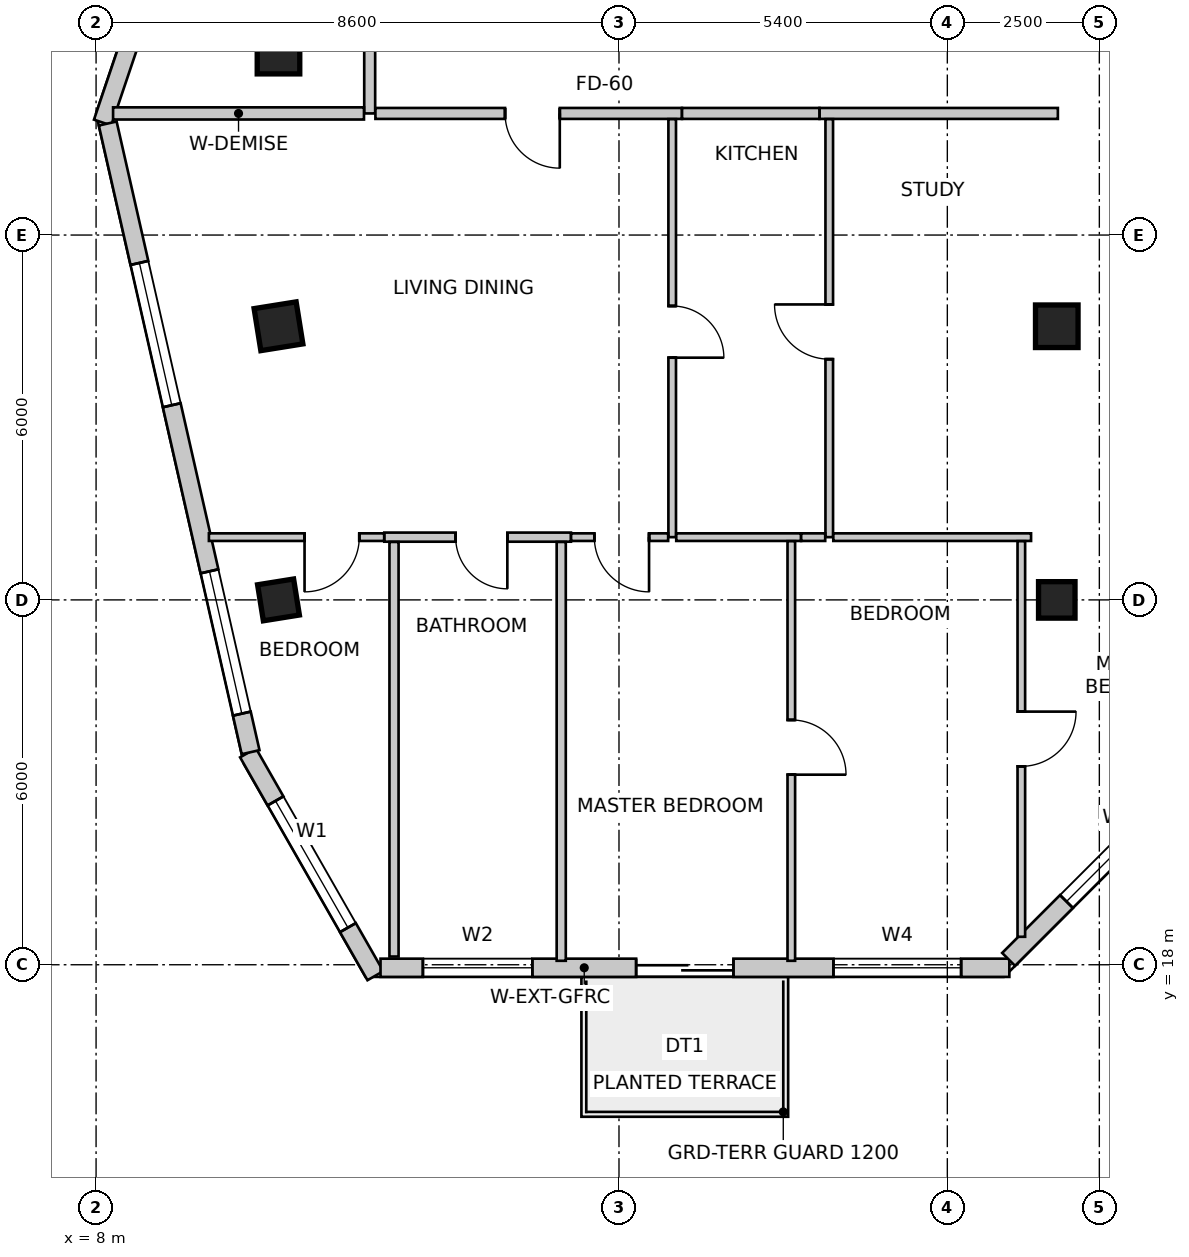
"""IFC4 building model, lengths in metres.
Left out: names, types, materials, properties, quantities, classifications, styles, units other than length and angle.
Written with IfcOpenShell. Run it as: python <this file> out.ifc"""

import sys

from ifc_helpers import new_model, si_unit, direction, frame, frame_2d, origin, origin_2d, place, context, subcontext, project, spatial, rectangle, extrude, source, transform, mapped, element, fill, save


model = new_model("IFC4")
c1 = context("Model", 3, precision=1e-05, world=origin(), true_north=direction((0.0, 1.0)))
c2 = subcontext(c1, "Body", "Model", "MODEL_VIEW")
j1 = project(units=[si_unit("LENGTHUNIT", "METRE"), si_unit("PLANEANGLEUNIT", "RADIAN")], contexts=[c1])
p1 = place(None, origin())
s1 = spatial("IfcSite", under=j1, at=p1, CompositionType="ELEMENT")
p2 = place(p1, origin())
s2 = spatial("IfcBuilding", under=s1, at=p2, CompositionType="ELEMENT")
p3 = place(p2, frame((0.0, 0.0, 249.3)))
s3 = spatial("IfcBuildingStorey", under=s2, at=p3, CompositionType="ELEMENT", Elevation=249.3)
m1 = source(origin(), c2, "Body", "SweptSolid", [
    extrude(rectangle(XDim=0.7, YDim=0.7, at=origin_2d()), origin(), (0.0, 0.0, 1.0), 3.6),
])
for number, where, z_axis, x_axis in (
    (1, (11.0, 33.0, 0.0), (0.0, 0.0, 1.0), (1.0, 0.0, 0.0)),
    (2, (11.0, 28.5, 0.0), (0.0, 0.0, 1.0), (0.158, -0.987, 0.0)),
):
    element("IfcColumn", number, at=place(p3, frame(where, z_axis=z_axis, x_axis=x_axis)), inside=s3, PredefinedType="COLUMN", context=c2, shape_type="MappedRepresentation", body=[
        mapped(m1, transform((0.0, 0.0, 0.0), scale=1.0)),
    ])
m2 = source(origin(), c2, "Body", "SweptSolid", [
    extrude(rectangle(XDim=0.6, YDim=0.6, at=origin_2d()), origin(), (0.0, 0.0, 1.0), 3.6),
])
p4 = place(p3, frame((11.0, 24.0, 0.0), z_axis=(0.0, 0.0, 1.0), x_axis=(0.158158067254, -0.987413806751, 0.0)))
e3 = element("IfcColumn", 3, at=p4, inside=s3, PredefinedType="COLUMN", context=c2, shape_type="MappedRepresentation", body=[
    mapped(m2, transform((0.0, 0.0, 0.0), scale=1.0)),
])
p5 = place(p3, frame((23.8, 28.5, 0.0), z_axis=(0.0, 0.0, 1.0), x_axis=(1.0, 0.0, 0.0)))
e4 = element("IfcColumn", 4, at=p5, inside=s3, PredefinedType="COLUMN", context=c2, shape_type="MappedRepresentation", body=[
    mapped(m1, transform((0.0, 0.0, 0.0), scale=1.0)),
])
p6 = place(p3, frame((23.8, 24.0, 0.0), z_axis=(0.0, 0.0, 1.0), x_axis=(1.0, 0.0, 0.0)))
e5 = element("IfcColumn", 5, at=p6, inside=s3, PredefinedType="COLUMN", context=c2, shape_type="MappedRepresentation", body=[
    mapped(m2, transform((0.0, 0.0, 0.0), scale=1.0)),
])
p7 = place(p3, frame((10.499, 21.485, 0.0), z_axis=(0.0, 0.0, 1.0), x_axis=(0.496163848656, -0.868228907194, 0.0)))
e6 = element("IfcWall", 6, at=p7, inside=s3, PredefinedType="SOLIDWALL", context=c2, shape_type="SweptSolid", body=[
    extrude(rectangle(XDim=4.222, YDim=0.3, at=frame_2d((2.111, 0.0))), origin(), (0.0, 0.0, 1.0), 3.35),
])
m3 = source(origin(), c2, "Body", "SweptSolid", [
    extrude(rectangle(XDim=2.4, YDim=2.2, at=frame_2d((1.2, 1.1))), frame((0.0, 0.16, 0.0), z_axis=(0.0, -1.0, 0.0), x_axis=(1.0, 0.0, 0.0)), (0.0, 0.0, 1.0), 0.32),
])
p8 = place(p7, frame((0.911, 0.0, 0.85)))
e7 = element("IfcOpeningElement", 7, at=p8, cuts=e6, PredefinedType="OPENING", context=c2, shape_type="MappedRepresentation", body=[
    mapped(m3, transform((0.0, 0.0, 0.0), scale=1.0)),
])
p9 = place(p3, frame((12.678, 17.95, 0.0), z_axis=(0.0, 0.0, 1.0), x_axis=(1.0, 0.0, 0.0)))
e8 = element("IfcWall", 8, at=p9, inside=s3, PredefinedType="SOLIDWALL", context=c2, shape_type="SweptSolid", body=[
    extrude(rectangle(XDim=10.342, YDim=0.3, at=frame_2d((5.171, 0.0))), origin(), (0.0, 0.0, 1.0), 3.35),
])
m4 = source(origin(), c2, "Body", "SweptSolid", [
    extrude(rectangle(XDim=1.6, YDim=2.15, at=frame_2d((0.8, 1.075))), frame((0.0, 0.16, 0.0), z_axis=(0.0, -1.0, 0.0), x_axis=(1.0, 0.0, 0.0)), (0.0, 0.0, 1.0), 0.32),
])
p10 = place(p9, frame((4.204, 0.0, 0.0)))
e9 = element("IfcOpeningElement", 9, at=p10, cuts=e8, PredefinedType="OPENING", context=c2, shape_type="MappedRepresentation", body=[
    mapped(m4, transform((0.0, 0.0, 0.0), scale=1.0)),
])
m5 = source(origin(), c2, "Body", "SweptSolid", [
    extrude(rectangle(XDim=1.8, YDim=2.1, at=frame_2d((0.9, 1.05))), frame((0.0, 0.16, 0.0), z_axis=(0.0, -1.0, 0.0), x_axis=(1.0, 0.0, 0.0)), (0.0, 0.0, 1.0), 0.32),
])
p11 = place(p9, frame((0.697, 0.0, 0.85)))
e10 = element("IfcOpeningElement", 10, at=p11, cuts=e8, PredefinedType="OPENING", context=c2, shape_type="MappedRepresentation", body=[
    mapped(m5, transform((0.0, 0.0, 0.0), scale=1.0)),
])
m6 = source(origin(), c2, "Body", "SweptSolid", [
    extrude(rectangle(XDim=2.1, YDim=2.0, at=frame_2d((1.05, 1.0))), frame((0.0, 0.16, 0.0), z_axis=(0.0, -1.0, 0.0), x_axis=(1.0, 0.0, 0.0)), (0.0, 0.0, 1.0), 0.32),
])
p12 = place(p9, frame((7.449, 0.0, 0.85)))
e11 = element("IfcOpeningElement", 11, at=p12, cuts=e8, PredefinedType="OPENING", context=c2, shape_type="MappedRepresentation", body=[
    mapped(m6, transform((0.0, 0.0, 0.0), scale=1.0)),
])
p13 = place(p3, frame((23.008, 18.088, 0.0), z_axis=(0.0, 0.0, 1.0), x_axis=(0.707106781187, 0.707106781187, 0.0)))
e12 = element("IfcWall", 12, at=p13, inside=s3, PredefinedType="SOLIDWALL", context=c2, shape_type="SweptSolid", body=[
    extrude(rectangle(XDim=4.781, YDim=0.3, at=frame_2d((2.39, 0.0))), origin(), (0.0, 0.0, 1.0), 3.35),
])
p14 = place(p13, frame((1.346, 0.0, 0.85)))
e13 = element("IfcOpeningElement", 13, at=p14, cuts=e12, PredefinedType="OPENING", context=c2, shape_type="MappedRepresentation", body=[
    mapped(m3, transform((0.0, 0.0, 0.0), scale=1.0)),
])
p15 = place(p3, frame((13.269, 47.134, 0.0), z_axis=(0.0, 0.0, 1.0), x_axis=(-0.3199211297, -0.947444178182, 0.0)))
e14 = element("IfcWall", 14, at=p15, inside=s3, PredefinedType="SOLIDWALL", context=c2, shape_type="SweptSolid", body=[
    extrude(rectangle(XDim=16.132, YDim=0.3, at=frame_2d((8.066, 0.0))), origin(), (0.0, 0.0, 1.0), 3.35),
])
p16 = place(p15, frame((2.585, 0.0, 0.85)))
e15 = element("IfcOpeningElement", 15, at=p16, cuts=e14, PredefinedType="OPENING", context=c2, shape_type="MappedRepresentation", body=[
    mapped(m6, transform((0.0, 0.0, 0.0), scale=1.0)),
])
p17 = place(p15, frame((7.267, 0.0, 0.85)))
e16 = element("IfcOpeningElement", 16, at=p17, cuts=e14, PredefinedType="OPENING", context=c2, shape_type="MappedRepresentation", body=[
    mapped(m3, transform((0.0, 0.0, 0.0), scale=1.0)),
])
p18 = place(p15, frame((12.249, 0.0, 0.85)))
e17 = element("IfcOpeningElement", 17, at=p18, cuts=e14, PredefinedType="OPENING", context=c2, shape_type="MappedRepresentation", body=[
    mapped(m6, transform((0.0, 0.0, 0.0), scale=1.0)),
])
p19 = place(p3, frame((8.191, 31.834, 0.0), z_axis=(0.0, 0.0, 1.0), x_axis=(0.221636032737, -0.975129462683, 0.0)))
e18 = element("IfcWall", 18, at=p19, inside=s3, PredefinedType="SOLIDWALL", context=c2, shape_type="SweptSolid", body=[
    extrude(rectangle(XDim=10.602, YDim=0.3, at=frame_2d((5.301, 0.0))), origin(), (0.0, 0.0, 1.0), 3.35),
])
p20 = place(p19, frame((2.351, 0.0, 0.85)))
e19 = element("IfcOpeningElement", 19, at=p20, cuts=e18, PredefinedType="OPENING", context=c2, shape_type="MappedRepresentation", body=[
    mapped(m3, transform((0.0, 0.0, 0.0), scale=1.0)),
])
p21 = place(p19, frame((7.552, 0.0, 0.85)))
e20 = element("IfcOpeningElement", 20, at=p21, cuts=e18, PredefinedType="OPENING", context=c2, shape_type="MappedRepresentation", body=[
    mapped(m3, transform((0.0, 0.0, 0.0), scale=1.0)),
])
p22 = place(p3, frame((12.5, 32.0, 0.0), z_axis=(0.0, 0.0, 1.0), x_axis=(0.0, 1.0, 0.0)))
e21 = element("IfcWall", 21, at=p22, inside=s3, PredefinedType="PARTITIONING", context=c2, shape_type="SweptSolid", body=[
    extrude(rectangle(XDim=1.556, YDim=0.18, at=frame_2d((0.778, 0.0))), origin(), (0.0, 0.0, 1.0), 2.935),
])
p23 = place(p3, frame((23.818, 32.0, 0.0), z_axis=(0.0, 0.0, 1.0), x_axis=(-1.0, 0.0, 0.0)))
e22 = element("IfcWall", 22, at=p23, inside=s3, PredefinedType="PARTITIONING", context=c2, shape_type="SweptSolid", body=[
    extrude(rectangle(XDim=3.92, YDim=0.18, at=frame_2d((1.96, 0.0))), origin(), (0.0, 0.0, 1.0), 2.935),
])
p24 = place(p3, frame((17.635, 32.0, 0.0), z_axis=(0.0, 0.0, 1.0), x_axis=(-1.0, 0.0, 0.0)))
e23 = element("IfcWall", 23, at=p24, inside=s3, PredefinedType="PARTITIONING", context=c2, shape_type="SweptSolid", body=[
    extrude(rectangle(XDim=5.041, YDim=0.18, at=frame_2d((2.521, 0.0))), origin(), (0.0, 0.0, 1.0), 2.935),
])
m7 = source(origin(), c2, "Body", "SweptSolid", [
    extrude(rectangle(XDim=0.9, YDim=2.15, at=frame_2d((0.45, 1.075))), frame((0.0, 0.1, 0.0), z_axis=(0.0, -1.0, 0.0), x_axis=(1.0, 0.0, 0.0)), (0.0, 0.0, 1.0), 0.2),
])
p25 = place(p24, frame((2.009, 0.0, 0.0)))
e24 = element("IfcOpeningElement", 24, at=p25, cuts=e23, PredefinedType="OPENING", context=c2, shape_type="MappedRepresentation", body=[
    mapped(m7, transform((0.0, 0.0, 0.0), scale=1.0)),
])
p26 = place(p3, frame((19.896, 32.0, 0.0), z_axis=(0.0, 0.0, 1.0), x_axis=(-1.0, 0.0, 0.0)))
e25 = element("IfcWall", 25, at=p26, inside=s3, PredefinedType="PARTITIONING", context=c2, shape_type="SweptSolid", body=[
    extrude(rectangle(XDim=2.259, YDim=0.18, at=frame_2d((1.129, 0.0))), origin(), (0.0, 0.0, 1.0), 3.35),
])
p27 = place(p3, frame((12.406, 32.0, 0.0), z_axis=(0.0, 0.0, 1.0), x_axis=(-1.0, 0.0, 0.0)))
e26 = element("IfcWall", 26, at=p27, inside=s3, PredefinedType="PARTITIONING", context=c2, shape_type="SweptSolid", body=[
    extrude(rectangle(XDim=4.126, YDim=0.2, at=frame_2d((2.063, 0.0))), origin(), (0.0, 0.0, 1.0), 2.642),
])
p28 = place(p3, frame((20.058, 25.032, 0.0), z_axis=(0.0, 0.0, 1.0), x_axis=(0.0, 1.0, 0.0)))
e27 = element("IfcWall", 27, at=p28, inside=s3, PredefinedType="PARTITIONING", context=c2, shape_type="SweptSolid", body=[
    extrude(rectangle(XDim=6.874, YDim=0.125, at=frame_2d((3.437, 0.0))), origin(), (0.0, 0.0, 1.0), 2.788),
])
m8 = source(origin(), c2, "Body", "SweptSolid", [
    extrude(rectangle(XDim=0.9, YDim=2.15, at=frame_2d((0.45, 1.075))), frame((0.0, 0.073, 0.0), z_axis=(0.0, -1.0, 0.0), x_axis=(1.0, 0.0, 0.0)), (0.0, 0.0, 1.0), 0.145),
])
p29 = place(p28, frame((2.927, 0.0, 0.0)))
e28 = element("IfcOpeningElement", 28, at=p29, cuts=e27, PredefinedType="OPENING", context=c2, shape_type="MappedRepresentation", body=[
    mapped(m8, transform((0.0, 0.0, 0.0), scale=1.0)),
])
p30 = place(p3, frame((23.377, 25.032, 0.0), z_axis=(0.0, 0.0, 1.0), x_axis=(-1.0, 0.0, 0.0)))
e29 = element("IfcWall", 29, at=p30, inside=s3, PredefinedType="PARTITIONING", context=c2, shape_type="SweptSolid", body=[
    extrude(rectangle(XDim=3.252, YDim=0.125, at=frame_2d((1.626, 0.0))), origin(), (0.0, 0.0, 1.0), 2.935),
])
p31 = place(p3, frame((17.475, 31.906, 0.0), z_axis=(0.0, 0.0, 1.0), x_axis=(0.0, -1.0, 0.0)))
e30 = element("IfcWall", 30, at=p31, inside=s3, PredefinedType="PARTITIONING", context=c2, shape_type="SweptSolid", body=[
    extrude(rectangle(XDim=6.874, YDim=0.125, at=frame_2d((3.437, 0.0))), origin(), (0.0, 0.0, 1.0), 2.788),
])
m9 = source(origin(), c2, "Body", "SweptSolid", [
    extrude(rectangle(XDim=0.85, YDim=2.15, at=frame_2d((0.425, 1.075))), frame((0.0, 0.073, 0.0), z_axis=(0.0, -1.0, 0.0), x_axis=(1.0, 0.0, 0.0)), (0.0, 0.0, 1.0), 0.145),
])
p32 = place(p31, frame((3.073, 0.0, 0.0)))
e31 = element("IfcOpeningElement", 31, at=p32, cuts=e30, PredefinedType="OPENING", context=c2, shape_type="MappedRepresentation", body=[
    mapped(m9, transform((0.0, 0.0, 0.0), scale=1.0)),
])
p33 = place(p3, frame((15.81, 25.032, 0.0), z_axis=(0.0, 0.0, 1.0), x_axis=(-1.0, 0.0, 0.0)))
e32 = element("IfcWall", 32, at=p33, inside=s3, PredefinedType="PARTITIONING", context=c2, shape_type="SweptSolid", body=[
    extrude(rectangle(XDim=3.07, YDim=0.15, at=frame_2d((1.535, 0.0))), origin(), (0.0, 0.0, 1.0), 2.788),
])
m10 = source(origin(), c2, "Body", "SweptSolid", [
    extrude(rectangle(XDim=0.85, YDim=2.15, at=frame_2d((0.425, 1.075))), frame((0.0, 0.085, 0.0), z_axis=(0.0, -1.0, 0.0), x_axis=(1.0, 0.0, 0.0)), (0.0, 0.0, 1.0), 0.17),
])
p34 = place(p33, frame((1.046, 0.0, 0.0)))
e33 = element("IfcOpeningElement", 33, at=p34, cuts=e32, PredefinedType="OPENING", context=c2, shape_type="MappedRepresentation", body=[
    mapped(m10, transform((0.0, 0.0, 0.0), scale=1.0)),
])
p35 = place(p3, frame((12.738, 25.032, 0.0), z_axis=(0.0, 0.0, 1.0), x_axis=(-1.0, 0.0, 0.0)))
e34 = element("IfcWall", 34, at=p35, inside=s3, PredefinedType="PARTITIONING", context=c2, shape_type="SweptSolid", body=[
    extrude(rectangle(XDim=2.883, YDim=0.125, at=frame_2d((1.441, 0.0))), origin(), (0.0, 0.0, 1.0), 2.642),
])
p36 = place(p35, frame((0.409, 0.0, 0.0)))
e35 = element("IfcOpeningElement", 35, at=p36, cuts=e34, PredefinedType="OPENING", context=c2, shape_type="MappedRepresentation", body=[
    mapped(m8, transform((0.0, 0.0, 0.0), scale=1.0)),
])
p37 = place(p3, frame((17.408, 25.032, 0.0), z_axis=(0.0, 0.0, 1.0), x_axis=(-1.0, 0.0, 0.0)))
e36 = element("IfcWall", 36, at=p37, inside=s3, PredefinedType="PARTITIONING", context=c2, shape_type="SweptSolid", body=[
    extrude(rectangle(XDim=1.596, YDim=0.125, at=frame_2d((0.798, 0.0))), origin(), (0.0, 0.0, 1.0), 3.35),
])
p38 = place(p37, frame((0.314, 0.0, 0.0)))
e37 = element("IfcOpeningElement", 37, at=p38, cuts=e36, PredefinedType="OPENING", context=c2, shape_type="MappedRepresentation", body=[
    mapped(m8, transform((0.0, 0.0, 0.0), scale=1.0)),
])
p39 = place(p3, frame((19.594, 25.032, 0.0), z_axis=(0.0, 0.0, 1.0), x_axis=(-1.0, 0.0, 0.0)))
e38 = element("IfcWall", 38, at=p39, inside=s3, PredefinedType="PARTITIONING", context=c2, shape_type="SweptSolid", body=[
    extrude(rectangle(XDim=2.052, YDim=0.125, at=frame_2d((1.026, 0.0))), origin(), (0.0, 0.0, 1.0), 3.35),
])
p40 = place(p3, frame((19.991, 25.032, 0.0), z_axis=(0.0, 0.0, 1.0), x_axis=(-1.0, 0.0, 0.0)))
e39 = element("IfcWall", 39, at=p40, inside=s3, PredefinedType="PARTITIONING", context=c2, shape_type="SweptSolid", body=[
    extrude(rectangle(XDim=0.396, YDim=0.125, at=frame_2d((0.198, 0.0))), origin(), (0.0, 0.0, 1.0), 3.35),
])
p41 = place(p3, frame((12.9, 18.135, 0.0), z_axis=(0.0, 0.0, 1.0), x_axis=(0.0, 1.0, 0.0)))
e40 = element("IfcWall", 40, at=p41, inside=s3, PredefinedType="PARTITIONING", context=c2, shape_type="SweptSolid", body=[
    extrude(rectangle(XDim=6.818, YDim=0.15, at=frame_2d((3.409, 0.0))), origin(), (0.0, 0.0, 1.0), 2.788),
])
p42 = place(p3, frame((15.65, 24.953, 0.0), z_axis=(0.0, 0.0, 1.0), x_axis=(0.0, -1.0, 0.0)))
e41 = element("IfcWall", 41, at=p42, inside=s3, PredefinedType="PARTITIONING", context=c2, shape_type="SweptSolid", body=[
    extrude(rectangle(XDim=6.888, YDim=0.15, at=frame_2d((3.444, 0.0))), origin(), (0.0, 0.0, 1.0), 2.979),
])
p43 = place(p3, frame((19.434, 24.966, 0.0), z_axis=(0.0, 0.0, 1.0), x_axis=(0.0, -1.0, 0.0)))
e42 = element("IfcWall", 42, at=p43, inside=s3, PredefinedType="PARTITIONING", context=c2, shape_type="SweptSolid", body=[
    extrude(rectangle(XDim=6.901, YDim=0.125, at=frame_2d((3.45, 0.0))), origin(), (0.0, 0.0, 1.0), 2.979),
])
p44 = place(p43, frame((2.94, 0.0, 0.0)))
e43 = element("IfcOpeningElement", 43, at=p44, cuts=e42, PredefinedType="OPENING", context=c2, shape_type="MappedRepresentation", body=[
    mapped(m8, transform((0.0, 0.0, 0.0), scale=1.0)),
])
p45 = place(p3, frame((23.217, 24.966, 0.0), z_axis=(0.0, 0.0, 1.0), x_axis=(0.0, -1.0, 0.0)))
e44 = element("IfcWall", 44, at=p45, inside=s3, PredefinedType="PARTITIONING", context=c2, shape_type="SweptSolid", body=[
    extrude(rectangle(XDim=6.506, YDim=0.125, at=frame_2d((3.253, 0.0))), origin(), (0.0, 0.0, 1.0), 2.935),
])
p46 = place(p45, frame((2.803, 0.0, 0.0)))
e45 = element("IfcOpeningElement", 45, at=p46, cuts=e44, PredefinedType="OPENING", context=c2, shape_type="MappedRepresentation", body=[
    mapped(m8, transform((0.0, 0.0, 0.0), scale=1.0)),
])
m11 = source(origin(), c2, "Body", "SweptSolid", [
    extrude(rectangle(XDim=2.4, YDim=2.2, at=frame_2d((1.2, 1.1))), frame((0.0, -0.015, 0.0), z_axis=(0.0, -1.0, 0.0), x_axis=(1.0, 0.0, 0.0)), (0.0, 0.0, 1.0), 0.06),
])
p47 = place(p8, origin())
e46 = element("IfcWindow", 46, at=p47, inside=s3, PartitioningType="SINGLE_PANEL", PredefinedType="WINDOW", context=c2, shape_type="MappedRepresentation", body=[
    mapped(m11, transform((0.0, 0.0, 0.0), scale=1.0)),
])
fill(e7, e46)
m12 = source(origin(), c2, "Body", "SweptSolid", [
    extrude(rectangle(XDim=1.6, YDim=2.15, at=frame_2d((0.8, 1.075))), frame((0.0, 0.025, 0.0), z_axis=(0.0, -1.0, 0.0), x_axis=(1.0, 0.0, 0.0)), (0.0, 0.0, 1.0), 0.05),
])
p48 = place(p10, origin())
e47 = element("IfcDoor", 47, at=p48, inside=s3, OperationType="DOUBLE_DOOR_SLIDING", PredefinedType="DOOR", context=c2, shape_type="MappedRepresentation", body=[
    mapped(m12, transform((0.0, 0.0, 0.0), scale=1.0)),
])
fill(e9, e47)
m13 = source(origin(), c2, "Body", "SweptSolid", [
    extrude(rectangle(XDim=1.8, YDim=2.1, at=frame_2d((0.9, 1.05))), frame((0.0, -0.015, 0.0), z_axis=(0.0, -1.0, 0.0), x_axis=(1.0, 0.0, 0.0)), (0.0, 0.0, 1.0), 0.06),
])
p49 = place(p11, origin())
e48 = element("IfcWindow", 48, at=p49, inside=s3, PartitioningType="SINGLE_PANEL", PredefinedType="WINDOW", context=c2, shape_type="MappedRepresentation", body=[
    mapped(m13, transform((0.0, 0.0, 0.0), scale=1.0)),
])
fill(e10, e48)
m14 = source(origin(), c2, "Body", "SweptSolid", [
    extrude(rectangle(XDim=2.1, YDim=2.0, at=frame_2d((1.05, 1.0))), frame((0.0, -0.015, 0.0), z_axis=(0.0, -1.0, 0.0), x_axis=(1.0, 0.0, 0.0)), (0.0, 0.0, 1.0), 0.06),
])
p50 = place(p12, origin())
e49 = element("IfcWindow", 49, at=p50, inside=s3, PartitioningType="SINGLE_PANEL", PredefinedType="WINDOW", context=c2, shape_type="MappedRepresentation", body=[
    mapped(m14, transform((0.0, 0.0, 0.0), scale=1.0)),
])
fill(e11, e49)
p51 = place(p14, origin())
e50 = element("IfcWindow", 50, at=p51, inside=s3, PartitioningType="SINGLE_PANEL", PredefinedType="WINDOW", context=c2, shape_type="MappedRepresentation", body=[
    mapped(m11, transform((0.0, 0.0, 0.0), scale=1.0)),
])
fill(e13, e50)
p52 = place(p20, origin())
e51 = element("IfcWindow", 51, at=p52, inside=s3, PartitioningType="SINGLE_PANEL", PredefinedType="WINDOW", context=c2, shape_type="MappedRepresentation", body=[
    mapped(m11, transform((0.0, 0.0, 0.0), scale=1.0)),
])
fill(e19, e51)
p53 = place(p21, origin())
e52 = element("IfcWindow", 52, at=p53, inside=s3, PartitioningType="SINGLE_PANEL", PredefinedType="WINDOW", context=c2, shape_type="MappedRepresentation", body=[
    mapped(m11, transform((0.0, 0.0, 0.0), scale=1.0)),
])
fill(e20, e52)
m15 = source(origin(), c2, "Body", "SweptSolid", [
    extrude(rectangle(XDim=0.9, YDim=2.15, at=frame_2d((0.45, 1.075))), frame((0.0, 0.025, 0.0), z_axis=(0.0, -1.0, 0.0), x_axis=(1.0, 0.0, 0.0)), (0.0, 0.0, 1.0), 0.05),
])
p54 = place(p29, origin())
e53 = element("IfcDoor", 53, at=p54, inside=s3, OperationType="SINGLE_SWING_RIGHT", PredefinedType="DOOR", context=c2, shape_type="MappedRepresentation", body=[
    mapped(m15, transform((0.0, 0.0, 0.0), scale=1.0)),
])
fill(e28, e53)
m16 = source(origin(), c2, "Body", "SweptSolid", [
    extrude(rectangle(XDim=0.9, YDim=2.15, at=frame_2d((0.45, 1.075))), frame((0.0, 0.025, 0.0), z_axis=(0.0, -1.0, 0.0), x_axis=(1.0, 0.0, 0.0)), (0.0, 0.0, 1.0), 0.05),
])
p55 = place(p25, origin())
e54 = element("IfcDoor", 54, at=p55, inside=s3, OperationType="SINGLE_SWING_LEFT", PredefinedType="DOOR", context=c2, shape_type="MappedRepresentation", body=[
    mapped(m16, transform((0.0, 0.0, 0.0), scale=1.0)),
])
fill(e24, e54)
m17 = source(origin(), c2, "Body", "SweptSolid", [
    extrude(rectangle(XDim=0.85, YDim=2.15, at=frame_2d((0.425, 1.075))), frame((0.0, 0.025, 0.0), z_axis=(0.0, -1.0, 0.0), x_axis=(1.0, 0.0, 0.0)), (0.0, 0.0, 1.0), 0.05),
])
p56 = place(p32, origin())
e55 = element("IfcDoor", 55, at=p56, inside=s3, OperationType="SINGLE_SWING_RIGHT", PredefinedType="DOOR", context=c2, shape_type="MappedRepresentation", body=[
    mapped(m17, transform((0.0, 0.0, 0.0), scale=1.0)),
])
fill(e31, e55)
p57 = place(p34, origin())
e56 = element("IfcDoor", 56, at=p57, inside=s3, OperationType="SINGLE_SWING_LEFT", PredefinedType="DOOR", context=c2, shape_type="MappedRepresentation", body=[
    mapped(m17, transform((0.0, 0.0, 0.0), scale=1.0)),
])
fill(e33, e56)
p58 = place(p36, origin())
e57 = element("IfcDoor", 57, at=p58, inside=s3, OperationType="SINGLE_SWING_RIGHT", PredefinedType="DOOR", context=c2, shape_type="MappedRepresentation", body=[
    mapped(m15, transform((0.0, 0.0, 0.0), scale=1.0)),
])
fill(e35, e57)
p59 = place(p38, origin())
e58 = element("IfcDoor", 58, at=p59, inside=s3, OperationType="SINGLE_SWING_LEFT", PredefinedType="DOOR", context=c2, shape_type="MappedRepresentation", body=[
    mapped(m15, transform((0.0, 0.0, 0.0), scale=1.0)),
])
fill(e37, e58)
p60 = place(p44, origin())
e59 = element("IfcDoor", 59, at=p60, inside=s3, OperationType="SINGLE_SWING_RIGHT", PredefinedType="DOOR", context=c2, shape_type="MappedRepresentation", body=[
    mapped(m15, transform((0.0, 0.0, 0.0), scale=1.0)),
])
fill(e43, e59)
p61 = place(p46, origin())
e60 = element("IfcDoor", 60, at=p61, inside=s3, OperationType="SINGLE_SWING_LEFT", PredefinedType="DOOR", context=c2, shape_type="MappedRepresentation", body=[
    mapped(m15, transform((0.0, 0.0, 0.0), scale=1.0)),
])
fill(e45, e60)
save(model, sys.argv[1])
